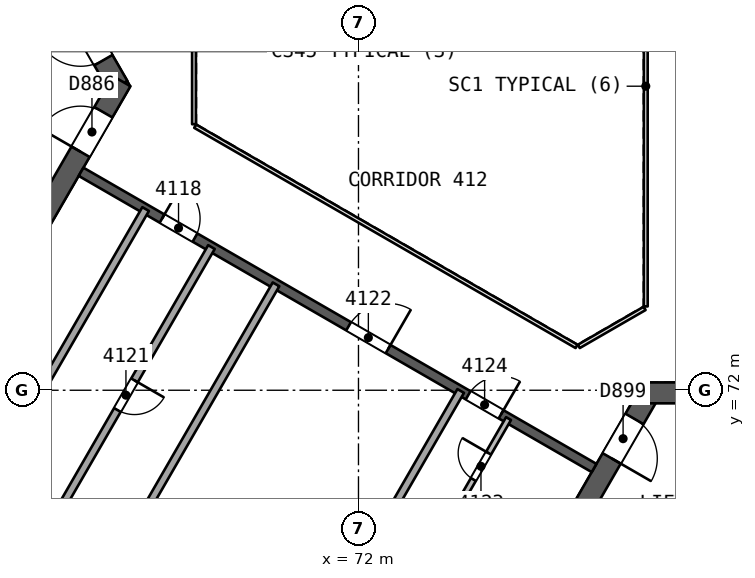
"""IFC4 building model, lengths in metres.
Left out: names, types, materials, properties, quantities, classifications, styles, units other than length and angle.
Written with IfcOpenShell. Run it as: python <this file> out.ifc"""

import sys

from ifc_helpers import new_model, si_unit, direction, frame, frame_2d, origin, place, context, subcontext, project, spatial, rectangle, extrude, element, fill, save


model = new_model("IFC4")
c1 = context("Model", 3, precision=1e-05, world=origin(), true_north=direction((0.0, 1.0)))
c2 = subcontext(c1, "Body", "Model", "MODEL_VIEW")
j1 = project(units=[si_unit("LENGTHUNIT", "METRE"), si_unit("PLANEANGLEUNIT", "RADIAN")], contexts=[c1])
p1 = place(None, origin())
s1 = spatial("IfcSite", under=j1, at=p1, CompositionType="ELEMENT")
p2 = place(p1, origin())
s2 = spatial("IfcBuilding", under=s1, at=p2, CompositionType="ELEMENT")
p3 = place(p2, frame((0.0, 0.0, 171.1)))
s3 = spatial("IfcBuildingStorey", under=s2, at=p3, CompositionType="ELEMENT", Elevation=171.1)
p4 = place(p3, frame((65.682, 80.0, 0.0), z_axis=(0.0, 0.0, 1.0), x_axis=(-0.500000202252, 0.866025287014, 0.0)))
e1 = element("IfcWall", 1, at=p4, inside=s3, PredefinedType="SHEAR", context=c2, shape_type="SweptSolid", body=[
    extrude(rectangle(XDim=10.221, YDim=0.55, at=frame_2d((5.111, 0.0))), origin(), (0.0, 0.0, 1.0), 3.7),
])
p5 = place(p4, frame((0.791, 0.0, 0.0)))
e2 = element("IfcOpeningElement", 2, at=p5, cuts=e1, PredefinedType="OPENING", context=c2, shape_type="SweptSolid", body=[
    extrude(rectangle(XDim=1.2, YDim=2.1, at=frame_2d((0.6, 1.05))), frame((0.0, 0.286, 0.0), z_axis=(0.0, -1.0, 0.0), x_axis=(1.0, 0.0, 0.0)), (0.0, 0.0, 1.0), 0.571),
])
p6 = place(p3, frame((60.709, 71.386, 0.0), z_axis=(0.0, 0.0, 1.0), x_axis=(0.500015938302, 0.866016201606, 0.0)))
e3 = element("IfcWall", 3, at=p6, inside=s3, PredefinedType="SHEAR", context=c2, shape_type="SweptSolid", body=[
    extrude(rectangle(XDim=10.105, YDim=0.55, at=frame_2d((5.053, 0.0))), origin(), (0.0, 0.0, 1.0), 3.7),
])
p7 = place(p6, frame((7.955, 0.0, 0.0)))
e4 = element("IfcOpeningElement", 4, at=p7, cuts=e3, PredefinedType="OPENING", context=c2, shape_type="SweptSolid", body=[
    extrude(rectangle(XDim=1.2, YDim=2.1, at=frame_2d((0.6, 1.05))), frame((0.0, 0.286, 0.0), z_axis=(0.0, -1.0, 0.0), x_axis=(1.0, 0.0, 0.0)), (0.0, 0.0, 1.0), 0.571),
])
p8 = place(p3, frame((79.659, 71.931, 0.0), z_axis=(0.0, 0.0, 1.0), x_axis=(-0.500000202252, -0.866025287014, 0.0)))
e5 = element("IfcWall", 5, at=p8, inside=s3, PredefinedType="SHEAR", context=c2, shape_type="SweptSolid", body=[
    extrude(rectangle(XDim=10.221, YDim=0.55, at=frame_2d((5.111, 0.0))), origin(), (0.0, 0.0, 1.0), 3.7),
])
p9 = place(p8, frame((0.791, 0.0, 0.0)))
e6 = element("IfcOpeningElement", 6, at=p9, cuts=e5, PredefinedType="OPENING", context=c2, shape_type="SweptSolid", body=[
    extrude(rectangle(XDim=1.2, YDim=2.1, at=frame_2d((0.6, 1.05))), frame((0.0, 0.286, 0.0), z_axis=(0.0, -1.0, 0.0), x_axis=(1.0, 0.0, 0.0)), (0.0, 0.0, 1.0), 0.571),
])
p10 = place(p3, frame((89.605, 71.931, 0.0), z_axis=(0.0, 0.0, 1.0), x_axis=(-1.0, 0.0, 0.0)))
e7 = element("IfcWall", 7, at=p10, inside=s3, PredefinedType="SHEAR", context=c2, shape_type="SweptSolid", body=[
    extrude(rectangle(XDim=10.105, YDim=0.55, at=frame_2d((5.052, 0.0))), origin(), (0.0, 0.0, 1.0), 3.7),
])
p11 = place(p10, frame((7.955, 0.0, 0.0)))
e8 = element("IfcOpeningElement", 8, at=p11, cuts=e7, PredefinedType="OPENING", context=c2, shape_type="SweptSolid", body=[
    extrude(rectangle(XDim=1.2, YDim=2.1, at=frame_2d((0.6, 1.05))), frame((0.0, 0.286, 0.0), z_axis=(0.0, -1.0, 0.0), x_axis=(1.0, 0.0, 0.0)), (0.0, 0.0, 1.0), 0.571),
])
p12 = place(p3, frame((64.7, 77.748, 0.0), z_axis=(0.0, 0.0, 1.0), x_axis=(0.866026492143, -0.499998114903, 0.0)))
e9 = element("IfcWall", 9, at=p12, inside=s3, PredefinedType="SHEAR", context=c2, shape_type="SweptSolid", body=[
    extrude(rectangle(XDim=15.588, YDim=0.25, at=frame_2d((7.794, 0.0))), origin(), (0.0, 0.0, 1.0), 3.25),
])
p13 = place(p12, frame((2.462, 0.0, 0.0)))
e10 = element("IfcOpeningElement", 10, at=p13, cuts=e9, PredefinedType="OPENING", context=c2, shape_type="SweptSolid", body=[
    extrude(rectangle(XDim=1.0, YDim=2.1, at=frame_2d((0.5, 1.05))), frame((0.0, 0.135, 0.0), z_axis=(0.0, -1.0, 0.0), x_axis=(1.0, 0.0, 0.0)), (0.0, 0.0, 1.0), 0.271),
])
p14 = place(p12, frame((8.129, 0.0, 0.0)))
e11 = element("IfcOpeningElement", 11, at=p14, cuts=e9, PredefinedType="OPENING", context=c2, shape_type="SweptSolid", body=[
    extrude(rectangle(XDim=1.2, YDim=2.4, at=frame_2d((0.6, 1.2))), frame((0.0, 0.135, 0.0), z_axis=(0.0, -1.0, 0.0), x_axis=(1.0, 0.0, 0.0)), (0.0, 0.0, 1.0), 0.271),
])
p15 = place(p12, frame((11.762, 0.0, 0.0)))
e12 = element("IfcOpeningElement", 12, at=p15, cuts=e9, PredefinedType="OPENING", context=c2, shape_type="SweptSolid", body=[
    extrude(rectangle(XDim=1.0, YDim=2.1, at=frame_2d((0.5, 1.05))), frame((0.0, 0.135, 0.0), z_axis=(0.0, -1.0, 0.0), x_axis=(1.0, 0.0, 0.0)), (0.0, 0.0, 1.0), 0.271),
])
p16 = place(p3, frame((68.131, 75.767, 0.0), z_axis=(0.0, 0.0, 1.0), x_axis=(-0.5000018851, -0.866024315419, 0.0)))
e13 = element("IfcWall", 13, at=p16, inside=s3, PredefinedType="PARTITIONING", context=c2, shape_type="SweptSolid", body=[
    extrude(rectangle(XDim=9.0, YDim=0.2, at=frame_2d((4.5, 0.0))), origin(), (0.0, 0.0, 1.0), 3.25),
])
p17 = place(p16, frame((4.05, 0.0, 0.0)))
e14 = element("IfcOpeningElement", 14, at=p17, cuts=e13, PredefinedType="OPENING", context=c2, shape_type="SweptSolid", body=[
    extrude(rectangle(XDim=0.9, YDim=2.1, at=frame_2d((0.45, 1.05))), frame((0.0, 0.11, 0.0), z_axis=(0.0, -1.0, 0.0), x_axis=(1.0, 0.0, 0.0)), (0.0, 0.0, 1.0), 0.221),
])
p18 = place(p3, frame((61.899, 68.973, 0.0), z_axis=(0.0, 0.0, 1.0), x_axis=(0.5000018851, 0.866024315419, 0.0)))
e15 = element("IfcWall", 15, at=p18, inside=s3, PredefinedType="PARTITIONING", context=c2, shape_type="SweptSolid", body=[
    extrude(rectangle(XDim=9.0, YDim=0.2, at=frame_2d((4.5, 0.0))), origin(), (0.0, 0.0, 1.0), 3.25),
])
for number, where, z_axis, x_axis in (
    (16, (64.129, 64.912, 0.0), (0.0, 0.0, 1.0), (0.5, 0.866, 0.0)),
    (17, (68.989, 62.106, 0.0), (0.0, 0.0, 1.0), (0.5, 0.866, 0.0)),
):
    element("IfcWall", number, at=place(p3, frame(where, z_axis=z_axis, x_axis=x_axis)), inside=s3, PredefinedType="PARTITIONING", context=c2, shape_type="SweptSolid", body=[
        extrude(rectangle(XDim=11.402, YDim=0.2, at=frame_2d((5.701, 0.0))), origin(), (0.0, 0.0, 1.0), 3.25),
    ])
p19 = place(p3, frame((74.498, 68.743, 0.0), z_axis=(0.0, 0.0, 1.0), x_axis=(0.499987231761, 0.866032775405, 0.0)))
e18 = element("IfcWall", 18, at=p19, inside=s3, PredefinedType="PARTITIONING", context=c2, shape_type="SweptSolid", body=[
    extrude(rectangle(XDim=2.9, YDim=0.15, at=frame_2d((1.45, 0.0))), origin(), (0.0, 0.0, 1.0), 3.25),
])
p20 = place(p19, frame((1.05, 0.0, 0.0)))
e19 = element("IfcOpeningElement", 19, at=p20, cuts=e18, PredefinedType="OPENING", context=c2, shape_type="SweptSolid", body=[
    extrude(rectangle(XDim=0.8, YDim=2.1, at=frame_2d((0.4, 1.05))), frame((0.0, 0.085, 0.0), z_axis=(0.0, -1.0, 0.0), x_axis=(1.0, 0.0, 0.0)), (0.0, 0.0, 1.0), 0.171),
])
p21 = place(p3, frame((88.899, 50.439, 0.0), z_axis=(0.0, 0.0, 1.0), x_axis=(-0.866024128163, 0.500002209434, 0.0)))
e20 = element("IfcWall", 20, at=p21, inside=s3, PredefinedType="SOLIDWALL", context=c2, shape_type="SweptSolid", body=[
    extrude(rectangle(XDim=53.635, YDim=0.3, at=frame_2d((26.817, 0.0))), origin(), (0.0, 0.0, 1.0), 3.25),
])
p22 = place(p21, frame((30.45, 0.0, 0.0)))
e21 = element("IfcOpeningElement", 21, at=p22, cuts=e20, PredefinedType="OPENING", context=c2, shape_type="SweptSolid", body=[
    extrude(rectangle(XDim=2.4, YDim=2.4, at=frame_2d((1.2, 1.2))), frame((0.0, 0.161, 0.0), z_axis=(0.0, -1.0, 0.0), x_axis=(1.0, 0.0, 0.0)), (0.0, 0.0, 1.0), 0.321),
])
p23 = place(p21, frame((41.683, 0.0, 0.0)))
e22 = element("IfcOpeningElement", 22, at=p23, cuts=e20, PredefinedType="OPENING", context=c2, shape_type="SweptSolid", body=[
    extrude(rectangle(XDim=2.4, YDim=2.4, at=frame_2d((1.2, 1.2))), frame((0.0, 0.161, 0.0), z_axis=(0.0, -1.0, 0.0), x_axis=(1.0, 0.0, 0.0)), (0.0, 0.0, 1.0), 0.321),
])
p24 = place(p21, frame((10.295, 0.0, 0.0)))
e23 = element("IfcOpeningElement", 23, at=p24, cuts=e20, PredefinedType="OPENING", context=c2, shape_type="SweptSolid", body=[
    extrude(rectangle(XDim=2.4, YDim=2.4, at=frame_2d((1.2, 1.2))), frame((0.0, 0.161, 0.0), z_axis=(0.0, -1.0, 0.0), x_axis=(1.0, 0.0, 0.0)), (0.0, 0.0, 1.0), 0.321),
])
p25 = place(p21, frame((24.982, 0.0, 0.9)))
e24 = element("IfcOpeningElement", 24, at=p25, cuts=e20, PredefinedType="OPENING", context=c2, shape_type="SweptSolid", body=[
    extrude(rectangle(XDim=1.8, YDim=1.5, at=frame_2d((0.9, 0.75))), frame((0.0, 0.161, 0.0), z_axis=(0.0, -1.0, 0.0), x_axis=(1.0, 0.0, 0.0)), (0.0, 0.0, 1.0), 0.321),
])
p26 = place(p3, frame((77.135, 64.952, 0.0), z_axis=(0.0, 0.0, 1.0), x_axis=(0.866031916153, 0.499988720078, 0.0)))
e25 = element("IfcWall", 25, at=p26, inside=s3, PredefinedType="SOLIDWALL", context=c2, shape_type="SweptSolid", body=[
    extrude(rectangle(XDim=11.35, YDim=0.2, at=frame_2d((5.675, 0.0))), origin(), (0.0, 0.0, 1.0), 3.25),
])
p27 = place(p3, frame((79.56, 74.206, 0.0), z_axis=(0.0, 0.0, 1.0), x_axis=(0.0, 1.0, 0.0)))
e26 = element("IfcWall", 26, at=p27, inside=s3, PredefinedType="PARTITIONING", context=c2, shape_type="SweptSolid", body=[
    extrude(rectangle(XDim=11.588, YDim=0.1, at=frame_2d((5.794, 0.0))), origin(), (0.0, 0.0, 1.0), 3.25),
])
p28 = place(p3, frame((67.672, 81.0, 0.0), z_axis=(0.0, 0.0, 1.0), x_axis=(0.0, -1.0, 0.0)))
e27 = element("IfcWall", 27, at=p28, inside=s3, PredefinedType="PARTITIONING", context=c2, shape_type="SweptSolid", body=[
    extrude(rectangle(XDim=2.0, YDim=0.1, at=frame_2d((1.0, 0.0))), origin(), (0.0, 0.0, 1.0), 3.25),
])
p29 = place(p3, frame((67.702, 78.948, 0.0), z_axis=(0.0, 0.0, 1.0), x_axis=(0.866026658274, -0.499997827154, 0.0)))
e28 = element("IfcWall", 28, at=p29, inside=s3, PredefinedType="PARTITIONING", context=c2, shape_type="SweptSolid", body=[
    extrude(rectangle(XDim=11.588, YDim=0.1, at=frame_2d((5.794, 0.0))), origin(), (0.0, 0.0, 1.0), 3.25),
])
p30 = place(p3, frame((77.798, 73.154, 0.0), z_axis=(0.0, 0.0, 1.0), x_axis=(0.866041268327, 0.499972520799, 0.0)))
e29 = element("IfcWall", 29, at=p30, inside=s3, PredefinedType="PARTITIONING", context=c2, shape_type="SweptSolid", body=[
    extrude(rectangle(XDim=2.0, YDim=0.1, at=frame_2d((1.0, 0.0))), origin(), (0.0, 0.0, 1.0), 3.25),
])
p31 = place(p13, origin())
e30 = element("IfcDoor", 30, at=p31, inside=s3, OperationType="SINGLE_SWING_LEFT", PredefinedType="NOTDEFINED", context=c2, shape_type="SweptSolid", body=[
    extrude(rectangle(XDim=1.0, YDim=2.1, at=frame_2d((0.5, 1.05))), frame((0.0, 0.025, 0.0), z_axis=(0.0, -1.0, 0.0), x_axis=(1.0, 0.0, 0.0)), (0.0, 0.0, 1.0), 0.05),
])
fill(e10, e30)
p32 = place(p17, origin())
e31 = element("IfcDoor", 31, at=p32, inside=s3, OperationType="SINGLE_SWING_LEFT", PredefinedType="NOTDEFINED", context=c2, shape_type="SweptSolid", body=[
    extrude(rectangle(XDim=0.9, YDim=2.1, at=frame_2d((0.45, 1.05))), frame((0.0, 0.025, 0.0), z_axis=(0.0, -1.0, 0.0), x_axis=(1.0, 0.0, 0.0)), (0.0, 0.0, 1.0), 0.05),
])
fill(e14, e31)
p33 = place(p14, origin())
e32 = element("IfcDoor", 32, at=p33, inside=s3, OperationType="SINGLE_SWING_RIGHT", PredefinedType="NOTDEFINED", context=c2, shape_type="SweptSolid", body=[
    extrude(rectangle(XDim=1.2, YDim=2.4, at=frame_2d((0.6, 1.2))), frame((0.0, 0.025, 0.0), z_axis=(0.0, -1.0, 0.0), x_axis=(1.0, 0.0, 0.0)), (0.0, 0.0, 1.0), 0.05),
])
fill(e11, e32)
p34 = place(p20, origin())
e33 = element("IfcDoor", 33, at=p34, inside=s3, OperationType="SINGLE_SWING_RIGHT", PredefinedType="NOTDEFINED", context=c2, shape_type="SweptSolid", body=[
    extrude(rectangle(XDim=0.8, YDim=2.1, at=frame_2d((0.4, 1.05))), frame((0.0, 0.025, 0.0), z_axis=(0.0, -1.0, 0.0), x_axis=(1.0, 0.0, 0.0)), (0.0, 0.0, 1.0), 0.05),
])
fill(e19, e33)
p35 = place(p15, origin())
e34 = element("IfcDoor", 34, at=p35, inside=s3, OperationType="SINGLE_SWING_RIGHT", PredefinedType="NOTDEFINED", context=c2, shape_type="SweptSolid", body=[
    extrude(rectangle(XDim=1.0, YDim=2.1, at=frame_2d((0.5, 1.05))), frame((0.0, 0.025, 0.0), z_axis=(0.0, -1.0, 0.0), x_axis=(1.0, 0.0, 0.0)), (0.0, 0.0, 1.0), 0.05),
])
fill(e12, e34)
p36 = place(p5, origin())
e35 = element("IfcDoor", 35, at=p36, inside=s3, OperationType="SINGLE_SWING_RIGHT", PredefinedType="NOTDEFINED", context=c2, shape_type="SweptSolid", body=[
    extrude(rectangle(XDim=1.2, YDim=2.1, at=frame_2d((0.6, 1.05))), frame((0.0, 0.025, 0.0), z_axis=(0.0, -1.0, 0.0), x_axis=(1.0, 0.0, 0.0)), (0.0, 0.0, 1.0), 0.05),
])
fill(e2, e35)
p37 = place(p7, origin())
e36 = element("IfcDoor", 36, at=p37, inside=s3, OperationType="SINGLE_SWING_LEFT", PredefinedType="NOTDEFINED", context=c2, shape_type="SweptSolid", body=[
    extrude(rectangle(XDim=1.2, YDim=2.1, at=frame_2d((0.6, 1.05))), frame((0.0, 0.025, 0.0), z_axis=(0.0, -1.0, 0.0), x_axis=(1.0, 0.0, 0.0)), (0.0, 0.0, 1.0), 0.05),
])
fill(e4, e36)
p38 = place(p9, origin())
e37 = element("IfcDoor", 37, at=p38, inside=s3, OperationType="SINGLE_SWING_RIGHT", PredefinedType="NOTDEFINED", context=c2, shape_type="SweptSolid", body=[
    extrude(rectangle(XDim=1.2, YDim=2.1, at=frame_2d((0.6, 1.05))), frame((0.0, 0.025, 0.0), z_axis=(0.0, -1.0, 0.0), x_axis=(1.0, 0.0, 0.0)), (0.0, 0.0, 1.0), 0.05),
])
fill(e6, e37)
save(model, sys.argv[1])
